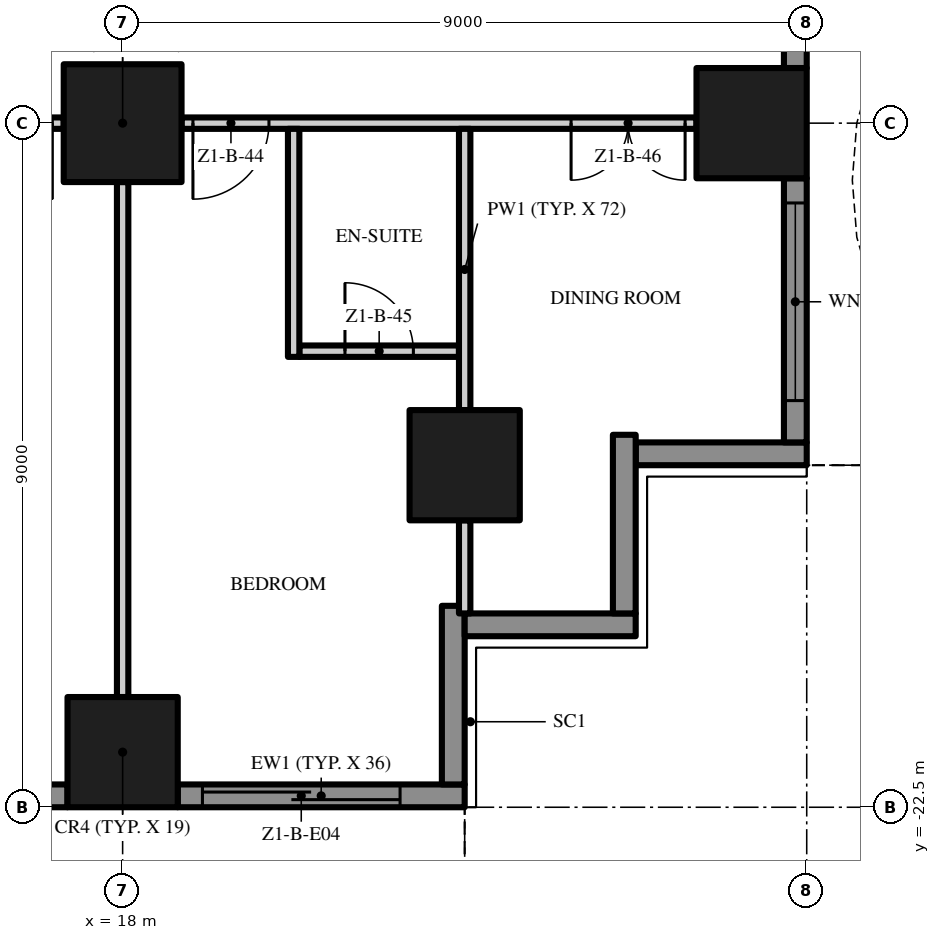
"""IFC4 building model, lengths in metres.
Left out: names, types, materials, properties, quantities, classifications, styles, units other than length and angle.
Written with IfcOpenShell. Run it as: python <this file> out.ifc"""

import sys

from ifc_helpers import new_model, si_unit, direction, frame, frame_2d, origin, origin_2d, place, context, subcontext, project, spatial, polyline, rectangle, outline, extrude, element, fill, save


model = new_model("IFC4")
c1 = context("Model", 3, precision=1e-05, world=origin(), true_north=direction((0.0, 1.0)))
c2 = subcontext(c1, "Body", "Model", "MODEL_VIEW")
j1 = project(units=[si_unit("LENGTHUNIT", "METRE"), si_unit("PLANEANGLEUNIT", "RADIAN")], contexts=[c1])
p1 = place(None, origin())
s1 = spatial("IfcSite", under=j1, at=p1, CompositionType="ELEMENT")
p2 = place(p1, origin())
s2 = spatial("IfcBuilding", under=s1, at=p2, CompositionType="ELEMENT")
p3 = place(p2, frame((0.0, 0.0, 30.2)))
s3 = spatial("IfcBuildingStorey", under=s2, at=p3, CompositionType="ELEMENT", Elevation=30.2)
p4 = place(p3, frame((18.0, -13.5, 0.0), z_axis=(0.0, 0.0, 1.0), x_axis=(1.0, 0.0, 0.0)))
e1 = element("IfcColumn", 1, at=p4, inside=s3, PredefinedType="COLUMN", context=c2, shape_type="SweptSolid", body=[
    extrude(rectangle(XDim=1.55, YDim=1.55, at=origin_2d()), origin(), (0.0, 0.0, 1.0), 3.5),
])
for number, where, z_axis, x_axis in (
    (2, (18.0, -21.775, 0.0), (0.0, 0.0, 1.0), (1.0, 0.0, 0.0)),
    (3, (26.275, -13.5, 0.0), (0.0, 0.0, 1.0), (1.0, 0.0, 0.0)),
    (4, (22.5, -18.0, 0.0), (0.0, 0.0, 1.0), (1.0, 0.0, 0.0)),
):
    element("IfcColumn", number, at=place(p3, frame(where, z_axis=z_axis, x_axis=x_axis)), inside=s3, PredefinedType="COLUMN", context=c2, shape_type="SweptSolid", body=[
        extrude(rectangle(XDim=1.45, YDim=1.45, at=origin_2d()), origin(), (0.0, 0.0, 1.0), 3.5),
    ])
p5 = place(p3, frame((17.275, -22.35, 0.0), z_axis=(0.0, 0.0, 1.0), x_axis=(-1.0, 0.0, 0.0)))
e5 = element("IfcWall", 5, at=p5, inside=s3, PredefinedType="SOLIDWALL", context=c2, shape_type="SweptSolid", body=[
    extrude(rectangle(XDim=7.55, YDim=0.3, at=frame_2d((3.775, 0.0))), origin(), (0.0, 0.0, 1.0), 3.5),
])
p6 = place(p5, frame((4.625, 0.0, 0.45)))
e6 = element("IfcOpeningElement", 6, at=p6, cuts=e5, PredefinedType="OPENING", context=c2, shape_type="SweptSolid", body=[
    extrude(rectangle(XDim=2.6, YDim=2.65, at=frame_2d((1.3, 1.325))), frame((0.0, 0.16, 0.0), z_axis=(0.0, -1.0, 0.0), x_axis=(1.0, 0.0, 0.0)), (0.0, 0.0, 1.0), 0.32),
])
p7 = place(p5, frame((0.325, 0.0, 0.45)))
e7 = element("IfcOpeningElement", 7, at=p7, cuts=e5, PredefinedType="OPENING", context=c2, shape_type="SweptSolid", body=[
    extrude(rectangle(XDim=2.6, YDim=2.65, at=frame_2d((1.3, 1.325))), frame((0.0, 0.16, 0.0), z_axis=(0.0, -1.0, 0.0), x_axis=(1.0, 0.0, 0.0)), (0.0, 0.0, 1.0), 0.32),
])
p8 = place(p3, frame((22.5, -22.35, 0.0), z_axis=(0.0, 0.0, 1.0), x_axis=(-1.0, 0.0, 0.0)))
e8 = element("IfcWall", 8, at=p8, inside=s3, PredefinedType="SOLIDWALL", context=c2, shape_type="SweptSolid", body=[
    extrude(rectangle(XDim=3.775, YDim=0.3, at=frame_2d((1.887, 0.0))), origin(), (0.0, 0.0, 1.0), 3.5),
])
p9 = place(p8, frame((0.85, 0.0, 0.0)))
e9 = element("IfcOpeningElement", 9, at=p9, cuts=e8, PredefinedType="OPENING", context=c2, shape_type="SweptSolid", body=[
    extrude(rectangle(XDim=2.6, YDim=2.4, at=frame_2d((1.3, 1.2))), frame((0.0, 0.16, 0.0), z_axis=(0.0, -1.0, 0.0), x_axis=(1.0, 0.0, 0.0)), (0.0, 0.0, 1.0), 0.32),
])
p10 = place(p3, frame((22.35, -19.85, 0.0), z_axis=(0.0, 0.0, 1.0), x_axis=(0.0, -1.0, 0.0)))
e10 = element("IfcWall", 10, at=p10, inside=s3, PredefinedType="SOLIDWALL", context=c2, shape_type="SweptSolid", body=[
    extrude(rectangle(XDim=2.35, YDim=0.3, at=frame_2d((1.175, 0.0))), origin(), (0.0, 0.0, 1.0), 3.5),
])
p11 = place(p3, frame((24.75, -20.1, 0.0), z_axis=(0.0, 0.0, 1.0), x_axis=(-1.0, 0.0, 0.0)))
e11 = element("IfcWall", 11, at=p11, inside=s3, PredefinedType="SOLIDWALL", context=c2, shape_type="SweptSolid", body=[
    extrude(rectangle(XDim=2.25, YDim=0.3, at=frame_2d((1.125, 0.0))), origin(), (0.0, 0.0, 1.0), 3.5),
])
p12 = place(p3, frame((24.6, -17.6, 0.0), z_axis=(0.0, 0.0, 1.0), x_axis=(0.0, -1.0, 0.0)))
e12 = element("IfcWall", 12, at=p12, inside=s3, PredefinedType="SOLIDWALL", context=c2, shape_type="SweptSolid", body=[
    extrude(rectangle(XDim=2.35, YDim=0.3, at=frame_2d((1.175, 0.0))), origin(), (0.0, 0.0, 1.0), 3.5),
])
p13 = place(p3, frame((27.0, -17.85, 0.0), z_axis=(0.0, 0.0, 1.0), x_axis=(-1.0, 0.0, 0.0)))
e13 = element("IfcWall", 13, at=p13, inside=s3, PredefinedType="SOLIDWALL", context=c2, shape_type="SweptSolid", body=[
    extrude(rectangle(XDim=2.25, YDim=0.3, at=frame_2d((1.125, 0.0))), origin(), (0.0, 0.0, 1.0), 3.5),
])
p14 = place(p3, frame((26.85, -14.225, 0.0), z_axis=(0.0, 0.0, 1.0), x_axis=(0.0, -1.0, 0.0)))
e14 = element("IfcWall", 14, at=p14, inside=s3, PredefinedType="SOLIDWALL", context=c2, shape_type="SweptSolid", body=[
    extrude(rectangle(XDim=3.475, YDim=0.3, at=frame_2d((1.738, 0.0))), origin(), (0.0, 0.0, 1.0), 3.5),
])
p15 = place(p14, frame((0.325, 0.0, 0.45)))
e15 = element("IfcOpeningElement", 15, at=p15, cuts=e14, PredefinedType="OPENING", context=c2, shape_type="SweptSolid", body=[
    extrude(rectangle(XDim=2.6, YDim=2.65, at=frame_2d((1.3, 1.325))), frame((0.0, 0.16, 0.0), z_axis=(0.0, -1.0, 0.0), x_axis=(1.0, 0.0, 0.0)), (0.0, 0.0, 1.0), 0.32),
])
p16 = place(p3, frame((26.85, -5.225, 0.0), z_axis=(0.0, 0.0, 1.0), x_axis=(0.0, -1.0, 0.0)))
e16 = element("IfcWall", 16, at=p16, inside=s3, PredefinedType="SOLIDWALL", context=c2, shape_type="SweptSolid", body=[
    extrude(rectangle(XDim=7.55, YDim=0.3, at=frame_2d((3.775, 0.0))), origin(), (0.0, 0.0, 1.0), 3.5),
])
p17 = place(p16, frame((4.625, 0.0, 0.45)))
e17 = element("IfcOpeningElement", 17, at=p17, cuts=e16, PredefinedType="OPENING", context=c2, shape_type="SweptSolid", body=[
    extrude(rectangle(XDim=2.6, YDim=2.65, at=frame_2d((1.3, 1.325))), frame((0.0, 0.16, 0.0), z_axis=(0.0, -1.0, 0.0), x_axis=(1.0, 0.0, 0.0)), (0.0, 0.0, 1.0), 0.32),
])
p18 = place(p16, frame((0.325, 0.0, 0.0)))
e18 = element("IfcOpeningElement", 18, at=p18, cuts=e16, PredefinedType="OPENING", context=c2, shape_type="SweptSolid", body=[
    extrude(rectangle(XDim=2.6, YDim=2.4, at=frame_2d((1.3, 1.2))), frame((0.0, 0.16, 0.0), z_axis=(0.0, -1.0, 0.0), x_axis=(1.0, 0.0, 0.0)), (0.0, 0.0, 1.0), 0.32),
])
p19 = place(p3, origin())
e19 = element("IfcWall", 19, at=p19, inside=s3, PredefinedType="USERDEFINED", context=c2, shape_type="SweptSolid", body=[
    extrude(outline(polyline([(-22.5, -24.3), (-21.0, -23.595), (-19.5, -23.159), (-18.75, -23.1), (-18.0, -23.159), (-16.5, -23.595), (-15.0, -24.3), (-13.5, -25.005), (-12.0, -25.441), (-11.25, -25.5), (-10.5, -25.441), (-9.0, -25.005), (-7.5, -24.3), (-6.0, -23.595), (-4.5, -23.159), (-3.75, -23.1), (-3.0, -23.159), (-1.5, -23.595), (0.0, -24.3), (1.5, -25.005), (3.0, -25.441), (3.75, -25.5), (4.5, -25.441), (6.0, -25.005), (7.5, -24.3), (9.0, -23.595), (10.5, -23.159), (11.25, -23.1), (12.0, -23.159), (13.5, -23.595), (15.0, -24.3), (16.5, -25.005), (18.0, -25.441), (18.75, -25.5), (19.5, -25.441), (21.0, -25.005), (22.5, -24.3), (22.394, -24.074), (20.911, -24.771), (19.455, -25.194), (18.75, -25.249), (18.045, -25.194), (16.589, -24.771), (15.106, -24.074), (13.589, -23.36), (12.045, -22.911), (11.25, -22.849), (10.455, -22.911), (8.911, -23.36), (7.394, -24.074), (5.911, -24.771), (4.455, -25.194), (3.75, -25.249), (3.045, -25.194), (1.589, -24.771), (0.106, -24.074), (-1.411, -23.36), (-2.955, -22.911), (-3.75, -22.849), (-4.545, -22.911), (-6.089, -23.36), (-7.606, -24.074), (-9.089, -24.771), (-10.545, -25.194), (-11.25, -25.249), (-11.955, -25.194), (-13.411, -24.771), (-14.894, -24.074), (-16.411, -23.36), (-17.955, -22.911), (-18.75, -22.849), (-19.545, -22.911), (-21.089, -23.36), (-22.606, -24.074), (-22.5, -24.3)])), origin(), (0.0, 0.0, 1.0), 0.9),
])
p20 = place(p3, origin())
e20 = element("IfcWall", 20, at=p20, inside=s3, PredefinedType="USERDEFINED", context=c2, shape_type="SweptSolid", body=[
    extrude(outline(polyline([(28.8, -18.0), (28.095, -16.5), (27.659, -15.0), (27.6, -14.25), (27.659, -13.5), (28.095, -12.0), (28.8, -10.5), (29.505, -9.0), (29.941, -7.5), (30.0, -6.75), (29.941, -6.0), (29.505, -4.5), (28.8, -3.0), (28.095, -1.5), (27.659, 0.0), (27.6, 0.75), (27.659, 1.5), (28.095, 3.0), (28.8, 4.5), (29.505, 6.0), (29.941, 7.5), (30.0, 8.25), (29.941, 9.0), (29.505, 10.5), (28.8, 12.0), (28.095, 13.5), (27.659, 15.0), (27.6, 15.75), (27.659, 16.5), (28.095, 18.0), (27.855, 18.07), (27.411, 16.545), (27.349, 15.75), (27.411, 14.955), (27.86, 13.411), (28.574, 11.894), (29.271, 10.411), (29.694, 8.955), (29.749, 8.25), (29.694, 7.545), (29.271, 6.089), (28.574, 4.606), (27.86, 3.089), (27.411, 1.545), (27.349, 0.75), (27.411, -0.045), (27.86, -1.589), (28.574, -3.106), (29.271, -4.589), (29.694, -6.045), (29.749, -6.75), (29.694, -7.455), (29.271, -8.911), (28.574, -10.394), (27.86, -11.911), (27.411, -13.455), (27.349, -14.25), (27.411, -15.045), (27.86, -16.589), (28.574, -18.106), (28.8, -18.0)])), origin(), (0.0, 0.0, 1.0), 0.9),
])
p21 = place(p3, frame((20.325, -16.5, 0.0), z_axis=(0.0, 0.0, 1.0), x_axis=(1.0, 0.0, 0.0)))
e21 = element("IfcWall", 21, at=p21, inside=s3, PredefinedType="PARTITIONING", context=c2, shape_type="SweptSolid", body=[
    extrude(rectangle(XDim=2.1, YDim=0.15, at=frame_2d((1.05, 0.0))), origin(), (0.0, 0.0, 1.0), 3.5),
])
p22 = place(p21, frame((0.6, 0.0, 0.0)))
e22 = element("IfcOpeningElement", 22, at=p22, cuts=e21, PredefinedType="OPENING", context=c2, shape_type="SweptSolid", body=[
    extrude(rectangle(XDim=0.9, YDim=2.1, at=frame_2d((0.45, 1.05))), frame((0.0, 0.085, 0.0), z_axis=(0.0, -1.0, 0.0), x_axis=(1.0, 0.0, 0.0)), (0.0, 0.0, 1.0), 0.17),
])
p23 = place(p3, frame((17.225, -13.5, 0.0), z_axis=(0.0, 0.0, 1.0), x_axis=(-1.0, 0.0, 0.0)))
e23 = element("IfcWall", 23, at=p23, inside=s3, PredefinedType="PARTITIONING", context=c2, shape_type="SweptSolid", body=[
    extrude(rectangle(XDim=7.45, YDim=0.15, at=frame_2d((3.725, 0.0))), origin(), (0.0, 0.0, 1.0), 3.5),
])
p24 = place(p23, frame((6.3, 0.0, 0.0)))
e24 = element("IfcOpeningElement", 24, at=p24, cuts=e23, PredefinedType="OPENING", context=c2, shape_type="SweptSolid", body=[
    extrude(rectangle(XDim=1.0, YDim=2.4, at=frame_2d((0.5, 1.2))), frame((0.0, 0.085, 0.0), z_axis=(0.0, -1.0, 0.0), x_axis=(1.0, 0.0, 0.0)), (0.0, 0.0, 1.0), 0.17),
])
p25 = place(p23, frame((0.15, 0.0, 0.0)))
e25 = element("IfcOpeningElement", 25, at=p25, cuts=e23, PredefinedType="OPENING", context=c2, shape_type="SweptSolid", body=[
    extrude(rectangle(XDim=1.0, YDim=2.4, at=frame_2d((0.5, 1.2))), frame((0.0, 0.085, 0.0), z_axis=(0.0, -1.0, 0.0), x_axis=(1.0, 0.0, 0.0)), (0.0, 0.0, 1.0), 0.17),
])
p26 = place(p3, frame((25.55, -13.5, 0.0), z_axis=(0.0, 0.0, 1.0), x_axis=(-1.0, 0.0, 0.0)))
e26 = element("IfcWall", 26, at=p26, inside=s3, PredefinedType="PARTITIONING", context=c2, shape_type="SweptSolid", body=[
    extrude(rectangle(XDim=6.775, YDim=0.15, at=frame_2d((3.388, 0.0))), origin(), (0.0, 0.0, 1.0), 3.5),
])
p27 = place(p26, frame((5.625, 0.0, 0.0)))
e27 = element("IfcOpeningElement", 27, at=p27, cuts=e26, PredefinedType="OPENING", context=c2, shape_type="SweptSolid", body=[
    extrude(rectangle(XDim=1.0, YDim=2.4, at=frame_2d((0.5, 1.2))), frame((0.0, 0.085, 0.0), z_axis=(0.0, -1.0, 0.0), x_axis=(1.0, 0.0, 0.0)), (0.0, 0.0, 1.0), 0.17),
])
p28 = place(p26, frame((0.15, 0.0, 0.0)))
e28 = element("IfcOpeningElement", 28, at=p28, cuts=e26, PredefinedType="OPENING", context=c2, shape_type="SweptSolid", body=[
    extrude(rectangle(XDim=1.5, YDim=2.4, at=frame_2d((0.75, 1.2))), frame((0.0, 0.085, 0.0), z_axis=(0.0, -1.0, 0.0), x_axis=(1.0, 0.0, 0.0)), (0.0, 0.0, 1.0), 0.17),
])
p29 = place(p3, frame((18.0, -21.05, 0.0), z_axis=(0.0, 0.0, 1.0), x_axis=(0.0, 1.0, 0.0)))
e29 = element("IfcWall", 29, at=p29, inside=s3, PredefinedType="PARTITIONING", context=c2, shape_type="SweptSolid", body=[
    extrude(rectangle(XDim=6.775, YDim=0.15, at=frame_2d((3.388, 0.0))), origin(), (0.0, 0.0, 1.0), 3.5),
])
p30 = place(p3, frame((20.25, -16.575, 0.0), z_axis=(0.0, 0.0, 1.0), x_axis=(0.0, 1.0, 0.0)))
e30 = element("IfcWall", 30, at=p30, inside=s3, PredefinedType="PARTITIONING", context=c2, shape_type="SweptSolid", body=[
    extrude(rectangle(XDim=3.0, YDim=0.15, at=frame_2d((1.5, 0.0))), origin(), (0.0, 0.0, 1.0), 3.5),
])
p31 = place(p3, frame((22.5, -19.95, 0.0), z_axis=(0.0, 0.0, 1.0), x_axis=(0.0, 1.0, 0.0)))
e31 = element("IfcWall", 31, at=p31, inside=s3, PredefinedType="PARTITIONING", context=c2, shape_type="SweptSolid", body=[
    extrude(rectangle(XDim=1.225, YDim=0.15, at=frame_2d((0.613, 0.0))), origin(), (0.0, 0.0, 1.0), 3.5),
])
p32 = place(p3, frame((22.5, -17.275, 0.0), z_axis=(0.0, 0.0, 1.0), x_axis=(0.0, 1.0, 0.0)))
e32 = element("IfcWall", 32, at=p32, inside=s3, PredefinedType="PARTITIONING", context=c2, shape_type="SweptSolid", body=[
    extrude(rectangle(XDim=3.7, YDim=0.15, at=frame_2d((1.85, 0.0))), origin(), (0.0, 0.0, 1.0), 3.5),
])
p33 = place(p9, origin())
e33 = element("IfcDoor", 33, at=p33, inside=s3, OperationType="SINGLE_SWING_LEFT", PredefinedType="DOOR", context=c2, shape_type="SweptSolid", body=[
    extrude(rectangle(XDim=2.6, YDim=2.4, at=frame_2d((1.3, 1.2))), frame((0.0, 0.025, 0.0), z_axis=(0.0, -1.0, 0.0), x_axis=(1.0, 0.0, 0.0)), (0.0, 0.0, 1.0), 0.05),
])
fill(e9, e33)
p34 = place(p15, origin())
e34 = element("IfcWindow", 34, at=p34, inside=s3, PartitioningType="SINGLE_PANEL", PredefinedType="WINDOW", context=c2, shape_type="SweptSolid", body=[
    extrude(rectangle(XDim=2.6, YDim=2.65, at=frame_2d((1.3, 1.325))), frame((0.0, 0.03, 0.0), z_axis=(0.0, -1.0, 0.0), x_axis=(1.0, 0.0, 0.0)), (0.0, 0.0, 1.0), 0.06),
])
fill(e15, e34)
p35 = place(p25, origin())
e35 = element("IfcDoor", 35, at=p35, inside=s3, OperationType="SINGLE_SWING_LEFT", PredefinedType="DOOR", context=c2, shape_type="SweptSolid", body=[
    extrude(rectangle(XDim=1.0, YDim=2.4, at=frame_2d((0.5, 1.2))), frame((0.0, 0.025, 0.0), z_axis=(0.0, -1.0, 0.0), x_axis=(1.0, 0.0, 0.0)), (0.0, 0.0, 1.0), 0.05),
])
fill(e25, e35)
p36 = place(p27, origin())
e36 = element("IfcDoor", 36, at=p36, inside=s3, OperationType="SINGLE_SWING_RIGHT", PredefinedType="DOOR", context=c2, shape_type="SweptSolid", body=[
    extrude(rectangle(XDim=1.0, YDim=2.4, at=frame_2d((0.5, 1.2))), frame((0.0, 0.025, 0.0), z_axis=(0.0, -1.0, 0.0), x_axis=(1.0, 0.0, 0.0)), (0.0, 0.0, 1.0), 0.05),
])
fill(e27, e36)
p37 = place(p22, origin())
e37 = element("IfcDoor", 37, at=p37, inside=s3, OperationType="SINGLE_SWING_LEFT", PredefinedType="DOOR", context=c2, shape_type="SweptSolid", body=[
    extrude(rectangle(XDim=0.9, YDim=2.1, at=frame_2d((0.45, 1.05))), frame((0.0, 0.025, 0.0), z_axis=(0.0, -1.0, 0.0), x_axis=(1.0, 0.0, 0.0)), (0.0, 0.0, 1.0), 0.05),
])
fill(e22, e37)
p38 = place(p28, origin())
e38 = element("IfcDoor", 38, at=p38, inside=s3, OperationType="DOUBLE_DOOR_SINGLE_SWING", PredefinedType="DOOR", context=c2, shape_type="SweptSolid", body=[
    extrude(rectangle(XDim=1.5, YDim=2.4, at=frame_2d((0.75, 1.2))), frame((0.0, 0.025, 0.0), z_axis=(0.0, -1.0, 0.0), x_axis=(1.0, 0.0, 0.0)), (0.0, 0.0, 1.0), 0.05),
])
fill(e28, e38)
save(model, sys.argv[1])
